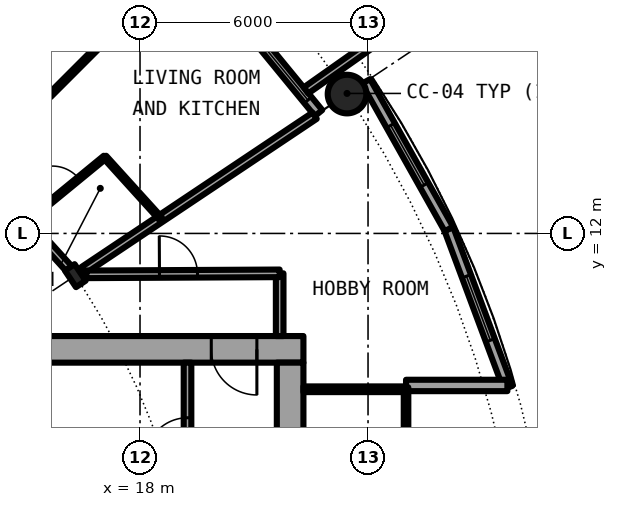
"""IFC4 building model, lengths in metres.
Left out: names, types, materials, properties, quantities, classifications, styles, units other than length and angle.
Written with IfcOpenShell. Run it as: python <this file> out.ifc"""

import sys

from ifc_helpers import new_model, si_unit, direction, frame, frame_2d, origin, origin_2d, place, context, subcontext, project, spatial, rectangle, hollow_circle, i_section, extrude, element, fill, save


model = new_model("IFC4")
c1 = context("Model", 3, precision=1e-05, world=origin(), true_north=direction((0.0, 1.0)))
c2 = subcontext(c1, "Body", "Model", "MODEL_VIEW")
j1 = project(units=[si_unit("LENGTHUNIT", "METRE"), si_unit("PLANEANGLEUNIT", "RADIAN")], contexts=[c1])
p1 = place(None, origin())
s1 = spatial("IfcSite", under=j1, at=p1, CompositionType="ELEMENT")
p2 = place(p1, origin())
s2 = spatial("IfcBuilding", under=s1, at=p2, CompositionType="ELEMENT")
p3 = place(p2, frame((0.0, 0.0, 72.75)))
s3 = spatial("IfcBuildingStorey", under=s2, at=p3, CompositionType="ELEMENT", Elevation=72.75)
p4 = place(p3, frame((23.448, 15.667, 0.0), z_axis=(0.0, 0.0, 1.0), x_axis=(1.0, 0.0, 0.0)))
e1 = element("IfcColumn", 1, at=p4, inside=s3, PredefinedType="COLUMN", context=c2, shape_type="SweptSolid", body=[
    extrude(hollow_circle(Radius=0.508, WallThickness=0.04, at=origin_2d()), origin(), (0.0, 0.0, 1.0), 3.05),
])
p5 = place(p3, frame((16.297, 10.889, 0.0), z_axis=(0.0, 0.0, 1.0), x_axis=(0.831469612303, 0.55557023302, 0.0)))
e2 = element("IfcColumn", 2, at=p5, inside=s3, PredefinedType="COLUMN", context=c2, shape_type="SweptSolid", body=[
    extrude(i_section(OverallWidth=0.306, OverallDepth=0.524, WebThickness=0.021, FlangeThickness=0.04, FilletRadius=0.027, at=origin_2d()), origin(), (0.0, 0.0, 1.0), 3.05),
])
p6 = place(p3, frame((22.699, 15.167, 0.0), z_axis=(0.0, 0.0, 1.0), x_axis=(-0.634382322723, 0.773019449054, 0.0)))
e3 = element("IfcWall", 3, at=p6, inside=s3, PredefinedType="SOLIDWALL", context=c2, shape_type="SweptSolid", body=[
    extrude(rectangle(XDim=5.352, YDim=0.25, at=frame_2d((2.676, 0.0))), origin(), (0.0, 0.0, 1.0), 2.7),
])
p7 = place(p6, frame((0.441, 0.0, 0.3)))
e4 = element("IfcOpeningElement", 4, at=p7, cuts=e3, PredefinedType="OPENING", context=c2, shape_type="SweptSolid", body=[
    extrude(rectangle(XDim=1.8, YDim=2.1, at=frame_2d((0.9, 1.05))), frame((0.0, 0.135, 0.0), z_axis=(0.0, -1.0, 0.0), x_axis=(1.0, 0.0, 0.0)), (0.0, 0.0, 1.0), 0.27),
])
p8 = place(p6, frame((3.51, 0.0, 0.0)))
e5 = element("IfcOpeningElement", 5, at=p8, cuts=e3, PredefinedType="OPENING", context=c2, shape_type="SweptSolid", body=[
    extrude(rectangle(XDim=1.0, YDim=2.2, at=frame_2d((0.5, 1.1))), frame((0.0, 0.135, 0.0), z_axis=(0.0, -1.0, 0.0), x_axis=(1.0, 0.0, 0.0)), (0.0, 0.0, 1.0), 0.27),
])
p9 = place(p3, frame((22.37, 15.765, -0.03), z_axis=(0.0, 0.0, 1.0), x_axis=(0.817256123454, 0.576274612209, 0.0)))
e6 = element("IfcWall", 6, at=p9, inside=s3, PredefinedType="SOLIDWALL", context=c2, shape_type="SweptSolid", body=[
    extrude(rectangle(XDim=2.933, YDim=0.2, at=frame_2d((1.466, 0.0))), origin(), (0.0, 0.0, 1.0), 2.73),
])
p10 = place(p3, frame((27.682, 7.945, 0.0), z_axis=(0.0, 0.0, 1.0), x_axis=(-0.349247811493, 0.937030397675, 0.0)))
e7 = element("IfcWall", 7, at=p10, inside=s3, PredefinedType="SOLIDWALL", context=c2, shape_type="SweptSolid", body=[
    extrude(rectangle(XDim=4.452, YDim=0.25, at=frame_2d((2.226, 0.0))), origin(), (0.0, 0.0, 1.0), 2.7),
])
p11 = place(p10, frame((1.327, 0.0, 0.3)))
e8 = element("IfcOpeningElement", 8, at=p11, cuts=e7, PredefinedType="OPENING", context=c2, shape_type="SweptSolid", body=[
    extrude(rectangle(XDim=1.8, YDim=2.1, at=frame_2d((0.9, 1.05))), frame((0.0, 0.135, 0.0), z_axis=(0.0, -1.0, 0.0), x_axis=(1.0, 0.0, 0.0)), (0.0, 0.0, 1.0), 0.27),
])
p12 = place(p3, frame((26.127, 12.117, 0.0), z_axis=(0.0, 0.0, 1.0), x_axis=(-0.489696356642, 0.871893042919, 0.0)))
e9 = element("IfcWall", 9, at=p12, inside=s3, PredefinedType="SOLIDWALL", context=c2, shape_type="SweptSolid", body=[
    extrude(rectangle(XDim=4.454, YDim=0.25, at=frame_2d((2.227, 0.0))), origin(), (0.0, 0.0, 1.0), 2.7),
])
p13 = place(p12, frame((1.327, 0.0, 0.3)))
e10 = element("IfcOpeningElement", 10, at=p13, cuts=e9, PredefinedType="OPENING", context=c2, shape_type="SweptSolid", body=[
    extrude(rectangle(XDim=1.8, YDim=2.1, at=frame_2d((0.9, 1.05))), frame((0.0, 0.135, 0.0), z_axis=(0.0, -1.0, 0.0), x_axis=(1.0, 0.0, 0.0)), (0.0, 0.0, 1.0), 0.27),
])
p14 = place(p3, frame((25.0, 8.0, 0.0), z_axis=(0.0, 0.0, 1.0), x_axis=(1.0, 0.0, 0.0)))
e11 = element("IfcWall", 11, at=p14, inside=s3, PredefinedType="SOLIDWALL", context=c2, shape_type="SweptSolid", body=[
    extrude(rectangle(XDim=2.667, YDim=0.3, at=frame_2d((1.333, 0.0))), origin(), (0.0, 0.0, 1.0), 2.7),
])
p15 = place(p3, frame((22.3, 8.95, 0.0), z_axis=(0.0, 0.0, 1.0), x_axis=(-1.0, 0.0, 0.0)))
e12 = element("IfcWall", 12, at=p15, inside=s3, PredefinedType="SHEAR", context=c2, shape_type="SweptSolid", body=[
    extrude(rectangle(XDim=14.0, YDim=0.7, at=frame_2d((7.0, 0.0))), origin(), (0.0, 0.0, 1.0), 3.05),
])
p16 = place(p15, frame((1.225, 0.0, 0.0)))
e13 = element("IfcOpeningElement", 13, at=p16, cuts=e12, PredefinedType="OPENING", context=c2, shape_type="SweptSolid", body=[
    extrude(rectangle(XDim=1.2, YDim=2.3, at=frame_2d((0.6, 1.15))), frame((0.0, 0.36, 0.0), z_axis=(0.0, -1.0, 0.0), x_axis=(1.0, 0.0, 0.0)), (0.0, 0.0, 1.0), 0.72),
])
p17 = place(p3, frame((21.95, 8.6, 0.0), z_axis=(0.0, 0.0, 1.0), x_axis=(0.0, -1.0, 0.0)))
e14 = element("IfcWall", 14, at=p17, inside=s3, PredefinedType="SHEAR", context=c2, shape_type="SweptSolid", body=[
    extrude(rectangle(XDim=17.2, YDim=0.7, at=frame_2d((8.6, 0.0))), origin(), (0.0, 0.0, 1.0), 3.05),
])
p18 = place(p17, frame((7.7, 0.0, 0.0)))
e15 = element("IfcOpeningElement", 15, at=p18, cuts=e14, PredefinedType="OPENING", context=c2, shape_type="SweptSolid", body=[
    extrude(rectangle(XDim=1.8, YDim=2.3, at=frame_2d((0.9, 1.15))), frame((0.0, 0.36, 0.0), z_axis=(0.0, -1.0, 0.0), x_axis=(1.0, 0.0, 0.0)), (0.0, 0.0, 1.0), 0.72),
])
p19 = place(p3, frame((19.25, 1.575, 0.0), z_axis=(0.0, 0.0, 1.0), x_axis=(0.0, 1.0, 0.0)))
e16 = element("IfcWall", 16, at=p19, inside=s3, PredefinedType="SOLIDWALL", context=c2, shape_type="SweptSolid", body=[
    extrude(rectangle(XDim=7.025, YDim=0.2, at=frame_2d((3.513, 0.0))), origin(), (0.0, 0.0, 1.0), 2.7),
])
p20 = place(p19, frame((4.475, 0.0, 0.0)))
e17 = element("IfcOpeningElement", 17, at=p20, cuts=e16, PredefinedType="OPENING", context=c2, shape_type="SweptSolid", body=[
    extrude(rectangle(XDim=1.1, YDim=2.3, at=frame_2d((0.55, 1.15))), frame((0.0, 0.11, 0.0), z_axis=(0.0, -1.0, 0.0), x_axis=(1.0, 0.0, 0.0)), (0.0, 0.0, 1.0), 0.22),
])
p21 = place(p3, frame((22.3, 7.9, 0.0), z_axis=(0.0, 0.0, 1.0), x_axis=(1.0, 0.0, 0.0)))
e18 = element("IfcWall", 18, at=p21, inside=s3, PredefinedType="PARTITIONING", context=c2, shape_type="SweptSolid", body=[
    extrude(rectangle(XDim=2.64, YDim=0.15, at=frame_2d((1.32, 0.0))), origin(), (0.0, 0.0, 1.0), 2.7),
])
p22 = place(p3, frame((25.0, -7.95, 0.0), z_axis=(0.0, 0.0, 1.0), x_axis=(0.0, 1.0, 0.0)))
e19 = element("IfcWall", 19, at=p22, inside=s3, PredefinedType="PARTITIONING", context=c2, shape_type="SweptSolid", body=[
    extrude(rectangle(XDim=15.9, YDim=0.12, at=frame_2d((7.95, 0.0))), origin(), (0.0, 0.0, 1.0), 2.7),
])
p23 = place(p22, frame((0.95, 0.0, 0.1)))
e20 = element("IfcOpeningElement", 20, at=p23, cuts=e19, PredefinedType="OPENING", context=c2, shape_type="SweptSolid", body=[
    extrude(rectangle(XDim=14.0, YDim=2.35, at=frame_2d((7.0, 1.175))), frame((0.0, 0.07, 0.0), z_axis=(0.0, -1.0, 0.0), x_axis=(1.0, 0.0, 0.0)), (0.0, 0.0, 1.0), 0.14),
])
p24 = place(p3, frame((21.675, 9.3, 0.0), z_axis=(0.0, 0.0, 1.0), x_axis=(0.0, 1.0, 0.0)))
e21 = element("IfcWall", 21, at=p24, inside=s3, PredefinedType="PARTITIONING", context=c2, shape_type="SweptSolid", body=[
    extrude(rectangle(XDim=1.65, YDim=0.2, at=frame_2d((0.825, 0.0))), origin(), (0.0, 0.0, 1.0), 2.7),
])
p25 = place(p3, frame((16.515, 11.034, 0.0), z_axis=(0.0, 0.0, 1.0), x_axis=(0.831382022135, 0.555701298605, 0.0)))
e22 = element("IfcWall", 22, at=p25, inside=s3, PredefinedType="PARTITIONING", context=c2, shape_type="SweptSolid", body=[
    extrude(rectangle(XDim=7.313, YDim=0.2, at=frame_2d((3.657, 0.0))), origin(), (0.0, 0.0, 1.0), 2.7),
])
p26 = place(p3, frame((12.435, 15.15, 0.0), z_axis=(0.0, 0.0, 1.0), x_axis=(0.634458323308, 0.772957072537, 0.0)))
e23 = element("IfcWall", 23, at=p26, inside=s3, PredefinedType="PARTITIONING", context=c2, shape_type="SweptSolid", body=[
    extrude(rectangle(XDim=7.576, YDim=0.2, at=frame_2d((3.788, 0.0))), origin(), (0.0, 0.0, 1.0), 2.7),
])
p27 = place(p3, frame((15.009, 12.31, 0.0), z_axis=(0.0, 0.0, 1.0), x_axis=(0.77319617123, 0.634166918717, 0.0)))
e24 = element("IfcWall", 24, at=p27, inside=s3, PredefinedType="PARTITIONING", context=c2, shape_type="SweptSolid", body=[
    extrude(rectangle(XDim=2.675, YDim=0.1, at=frame_2d((1.337, 0.0))), origin(), (0.0, 0.0, 1.0), 2.7),
])
p28 = place(p27, frame((0.887, 0.0, 0.0)))
e25 = element("IfcOpeningElement", 25, at=p28, cuts=e24, PredefinedType="OPENING", context=c2, shape_type="SweptSolid", body=[
    extrude(rectangle(XDim=0.9, YDim=2.3, at=frame_2d((0.45, 1.15))), frame((0.0, 0.06, 0.0), z_axis=(0.0, -1.0, 0.0), x_axis=(1.0, 0.0, 0.0)), (0.0, 0.0, 1.0), 0.12),
])
p29 = place(p3, frame((15.612, 15.622, 0.0), z_axis=(0.0, 0.0, 1.0), x_axis=(0.706914880313, 0.707298629994, 0.0)))
e26 = element("IfcWall", 26, at=p29, inside=s3, PredefinedType="PARTITIONING", context=c2, shape_type="SweptSolid", body=[
    extrude(rectangle(XDim=5.09, YDim=0.1, at=frame_2d((2.545, 0.0))), origin(), (0.0, 0.0, 1.0), 2.7),
])
p30 = place(p29, frame((2.095, 0.0, 0.0)))
e27 = element("IfcOpeningElement", 27, at=p30, cuts=e26, PredefinedType="OPENING", context=c2, shape_type="SweptSolid", body=[
    extrude(rectangle(XDim=0.9, YDim=2.3, at=frame_2d((0.45, 1.15))), frame((0.0, 0.06, 0.0), z_axis=(0.0, -1.0, 0.0), x_axis=(1.0, 0.0, 0.0)), (0.0, 0.0, 1.0), 0.12),
])
p31 = place(p3, frame((16.589, 10.924, 0.0), z_axis=(0.0, 0.0, 1.0), x_axis=(0.999987054722, 0.005088259783, 0.0)))
e28 = element("IfcWall", 28, at=p31, inside=s3, PredefinedType="PARTITIONING", context=c2, shape_type="SweptSolid", body=[
    extrude(rectangle(XDim=5.086, YDim=0.2, at=frame_2d((2.543, 0.0))), origin(), (0.0, 0.0, 1.0), 2.7),
])
p32 = place(p31, frame((1.923, 0.0, 0.0)))
e29 = element("IfcOpeningElement", 29, at=p32, cuts=e28, PredefinedType="OPENING", context=c2, shape_type="SweptSolid", body=[
    extrude(rectangle(XDim=1.0, YDim=2.3, at=frame_2d((0.5, 1.15))), frame((0.0, 0.11, 0.0), z_axis=(0.0, -1.0, 0.0), x_axis=(1.0, 0.0, 0.0)), (0.0, 0.0, 1.0), 0.22),
])
p33 = place(p3, frame((12.434, 15.151, 0.0), z_axis=(0.0, 0.0, 1.0), x_axis=(0.671601747072, -0.740912338492, 0.0)))
e30 = element("IfcWall", 30, at=p33, inside=s3, PredefinedType="PARTITIONING", context=c2, shape_type="SweptSolid", body=[
    extrude(rectangle(XDim=5.597, YDim=0.2, at=frame_2d((2.799, 0.0))), origin(), (0.0, 0.0, 1.0), 2.38),
])
p34 = place(p33, frame((1.417, 0.0, 0.0)))
e31 = element("IfcOpeningElement", 31, at=p34, cuts=e30, PredefinedType="OPENING", context=c2, shape_type="SweptSolid", body=[
    extrude(rectangle(XDim=1.0, YDim=2.3, at=frame_2d((0.5, 1.15))), frame((0.0, 0.11, 0.0), z_axis=(0.0, -1.0, 0.0), x_axis=(1.0, 0.0, 0.0)), (0.0, 0.0, 1.0), 0.22),
])
p35 = place(p3, frame((17.072, 14.011, 0.0), z_axis=(0.0, 0.0, 1.0), x_axis=(0.67169789574, -0.740825172937, 0.0)))
e32 = element("IfcWall", 32, at=p35, inside=s3, PredefinedType="PARTITIONING", context=c2, shape_type="SweptSolid", body=[
    extrude(rectangle(XDim=2.183, YDim=0.1, at=frame_2d((1.091, 0.0))), origin(), (0.0, 0.0, 1.0), 2.7),
])
p36 = place(p7, origin())
e33 = element("IfcWindow", 33, at=p36, inside=s3, PartitioningType="SINGLE_PANEL", PredefinedType="WINDOW", context=c2, shape_type="SweptSolid", body=[
    extrude(rectangle(XDim=1.8, YDim=2.1, at=frame_2d((0.9, 1.05))), frame((0.0, 0.03, 0.0), z_axis=(0.0, -1.0, 0.0), x_axis=(1.0, 0.0, 0.0)), (0.0, 0.0, 1.0), 0.06),
])
fill(e4, e33)
p37 = place(p11, origin())
e34 = element("IfcWindow", 34, at=p37, inside=s3, PartitioningType="SINGLE_PANEL", PredefinedType="WINDOW", context=c2, shape_type="SweptSolid", body=[
    extrude(rectangle(XDim=1.8, YDim=2.1, at=frame_2d((0.9, 1.05))), frame((0.0, 0.03, 0.0), z_axis=(0.0, -1.0, 0.0), x_axis=(1.0, 0.0, 0.0)), (0.0, 0.0, 1.0), 0.06),
])
fill(e8, e34)
p38 = place(p13, origin())
e35 = element("IfcWindow", 35, at=p38, inside=s3, PartitioningType="SINGLE_PANEL", PredefinedType="WINDOW", context=c2, shape_type="SweptSolid", body=[
    extrude(rectangle(XDim=1.8, YDim=2.1, at=frame_2d((0.9, 1.05))), frame((0.0, 0.03, 0.0), z_axis=(0.0, -1.0, 0.0), x_axis=(1.0, 0.0, 0.0)), (0.0, 0.0, 1.0), 0.06),
])
fill(e10, e35)
p39 = place(p20, origin())
e36 = element("IfcDoor", 36, at=p39, inside=s3, OperationType="SINGLE_SWING_LEFT", PredefinedType="DOOR", context=c2, shape_type="SweptSolid", body=[
    extrude(rectangle(XDim=1.1, YDim=2.3, at=frame_2d((0.55, 1.15))), frame((0.0, 0.025, 0.0), z_axis=(0.0, -1.0, 0.0), x_axis=(1.0, 0.0, 0.0)), (0.0, 0.0, 1.0), 0.05),
])
fill(e17, e36)
p40 = place(p16, origin())
e37 = element("IfcDoor", 37, at=p40, inside=s3, OperationType="SINGLE_SWING_RIGHT", PredefinedType="DOOR", context=c2, shape_type="SweptSolid", body=[
    extrude(rectangle(XDim=1.2, YDim=2.3, at=frame_2d((0.6, 1.15))), frame((0.0, 0.025, 0.0), z_axis=(0.0, -1.0, 0.0), x_axis=(1.0, 0.0, 0.0)), (0.0, 0.0, 1.0), 0.05),
])
fill(e13, e37)
p41 = place(p23, origin())
e38 = element("IfcWindow", 38, at=p41, inside=s3, PartitioningType="SINGLE_PANEL", PredefinedType="WINDOW", context=c2, shape_type="SweptSolid", body=[
    extrude(rectangle(XDim=14.0, YDim=2.35, at=frame_2d((7.0, 1.175))), frame((0.0, 0.03, 0.0), z_axis=(0.0, -1.0, 0.0), x_axis=(1.0, 0.0, 0.0)), (0.0, 0.0, 1.0), 0.06),
])
fill(e20, e38)
p42 = place(p28, origin())
e39 = element("IfcDoor", 39, at=p42, inside=s3, OperationType="SINGLE_SWING_RIGHT", PredefinedType="DOOR", context=c2, shape_type="SweptSolid", body=[
    extrude(rectangle(XDim=0.9, YDim=2.3, at=frame_2d((0.45, 1.15))), frame((0.0, 0.025, 0.0), z_axis=(0.0, -1.0, 0.0), x_axis=(1.0, 0.0, 0.0)), (0.0, 0.0, 1.0), 0.05),
])
fill(e25, e39)
p43 = place(p32, origin())
e40 = element("IfcDoor", 40, at=p43, inside=s3, OperationType="SINGLE_SWING_LEFT", PredefinedType="DOOR", context=c2, shape_type="SweptSolid", body=[
    extrude(rectangle(XDim=1.0, YDim=2.3, at=frame_2d((0.5, 1.15))), frame((0.0, 0.025, 0.0), z_axis=(0.0, -1.0, 0.0), x_axis=(1.0, 0.0, 0.0)), (0.0, 0.0, 1.0), 0.05),
])
fill(e29, e40)
save(model, sys.argv[1])
